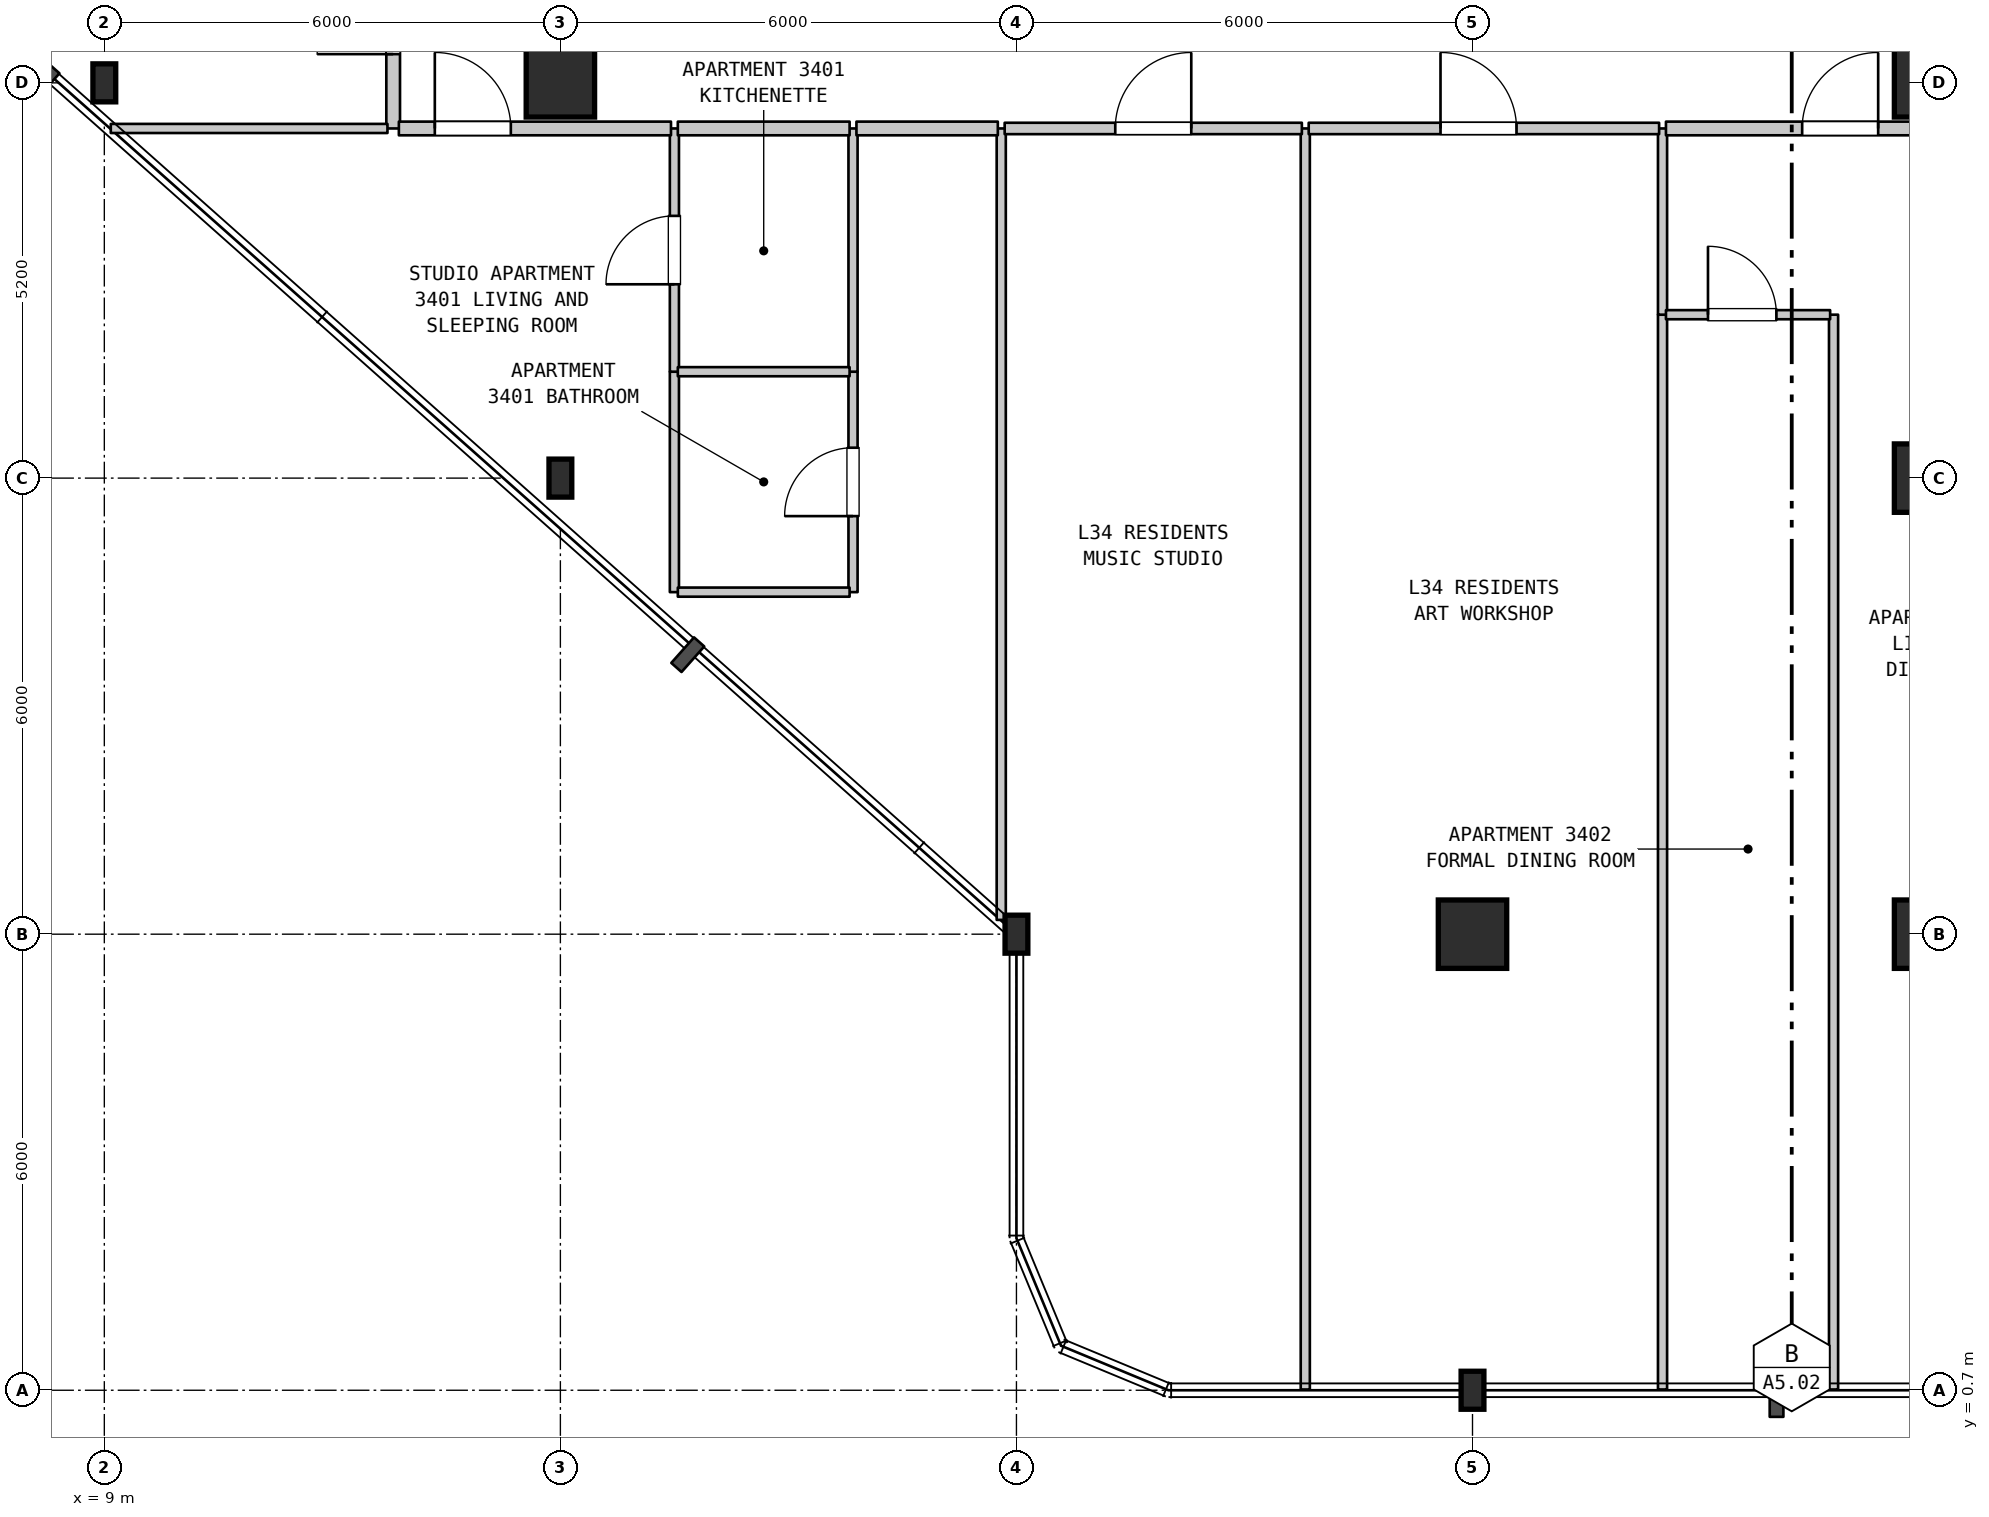
"""IFC4 building model, lengths in metres.
Left out: names, types, materials, properties, quantities, classifications, styles, units other than length and angle.
Written with IfcOpenShell. Run it as: python <this file> out.ifc"""

import sys

from ifc_helpers import new_model, si_unit, direction, frame, frame_2d, origin, origin_2d, place, context, subcontext, project, spatial, rectangle, i_section, extrude, element, fill, save


model = new_model("IFC4")
c1 = context("Model", 3, precision=1e-05, world=origin(), true_north=direction((0.0, 1.0)))
c2 = subcontext(c1, "Body", "Model", "MODEL_VIEW")
j1 = project(units=[si_unit("LENGTHUNIT", "METRE"), si_unit("PLANEANGLEUNIT", "RADIAN")], contexts=[c1])
p1 = place(None, origin())
s1 = spatial("IfcSite", under=j1, at=p1, CompositionType="ELEMENT")
p2 = place(p1, origin())
s2 = spatial("IfcBuilding", under=s1, at=p2, CompositionType="ELEMENT")
p3 = place(p2, frame((0.0, 0.0, 140.9)))
s3 = spatial("IfcBuildingStorey", under=s2, at=p3, CompositionType="ELEMENT", Elevation=140.9)
for number, where, z_axis, x_axis in (
    (1, (9.0, 17.9, 0.0), (0.0, 0.0, 1.0), (1.0, 0.0, 0.0)),
    (2, (15.0, 12.7, 0.0), (0.0, 0.0, 1.0), (1.0, 0.0, 0.0)),
):
    element("IfcColumn", number, at=place(p3, frame(where, z_axis=z_axis, x_axis=x_axis)), inside=s3, PredefinedType="COLUMN", context=c2, shape_type="SweptSolid", body=[
        extrude(i_section(OverallWidth=0.3, OverallDepth=0.5, WebThickness=0.014, FlangeThickness=0.028, FilletRadius=0.027, at=origin_2d()), origin(), (0.0, 0.0, 1.0), 3.7),
    ])
p4 = place(p3, frame((15.0, 17.9, 0.0), z_axis=(0.0, 0.0, 1.0), x_axis=(1.0, 0.0, 0.0)))
e3 = element("IfcColumn", 3, at=p4, inside=s3, PredefinedType="COLUMN", context=c2, shape_type="SweptSolid", body=[
    extrude(rectangle(XDim=0.9, YDim=0.9, at=origin_2d()), origin(), (0.0, 0.0, 1.0), 3.7),
])
for number, where, z_axis, x_axis in (
    (4, (21.0, 6.7, 0.0), (0.0, 0.0, 1.0), (1.0, 0.0, 0.0)),
    (5, (27.0, 0.7, 0.0), (0.0, 0.0, 1.0), (1.0, 0.0, 0.0)),
):
    element("IfcColumn", number, at=place(p3, frame(where, z_axis=z_axis, x_axis=x_axis)), inside=s3, PredefinedType="COLUMN", context=c2, shape_type="SweptSolid", body=[
        extrude(i_section(OverallWidth=0.3, OverallDepth=0.5, WebThickness=0.014, FlangeThickness=0.028, FilletRadius=0.027, at=origin_2d()), origin(), (0.0, 0.0, 1.0), 3.7),
    ])
for number, where, z_axis, x_axis in (
    (6, (27.0, 6.7, 0.0), (0.0, 0.0, 1.0), (1.0, 0.0, 0.0)),
    (7, (33.0, 6.7, 0.0), (0.0, 0.0, 1.0), (1.0, 0.0, 0.0)),
    (8, (33.0, 12.7, 0.0), (0.0, 0.0, 1.0), (1.0, 0.0, 0.0)),
    (9, (33.0, 17.9, 0.0), (0.0, 0.0, 1.0), (1.0, 0.0, 0.0)),
):
    element("IfcColumn", number, at=place(p3, frame(where, z_axis=z_axis, x_axis=x_axis)), inside=s3, PredefinedType="COLUMN", context=c2, shape_type="SweptSolid", body=[
        extrude(rectangle(XDim=0.9, YDim=0.9, at=origin_2d()), origin(), (0.0, 0.0, 1.0), 3.7),
    ])
p5 = place(p3, frame((12.8, 17.3, 0.0), z_axis=(0.0, 0.0, 1.0), x_axis=(0.0, 1.0, 0.0)))
e10 = element("IfcWall", 10, at=p5, inside=s3, PredefinedType="STANDARD", context=c2, shape_type="SweptSolid", body=[
    extrude(rectangle(XDim=3.1, YDim=0.18, at=frame_2d((1.55, 0.0))), origin(), (0.0, 0.0, 1.0), 3.385),
])
p6 = place(p5, frame((0.978, 0.0, 0.0)))
e11 = element("IfcOpeningElement", 11, at=p6, cuts=e10, PredefinedType="OPENING", context=c2, shape_type="SweptSolid", body=[
    extrude(rectangle(XDim=1.0, YDim=2.15, at=frame_2d((0.5, 1.075))), frame((0.0, 0.1, 0.0), z_axis=(0.0, -1.0, 0.0), x_axis=(1.0, 0.0, 0.0)), (0.0, 0.0, 1.0), 0.2),
])
p7 = place(p3, frame((16.5, 11.2, 0.0), z_axis=(0.0, 0.0, 1.0), x_axis=(0.0, 1.0, 0.0)))
e12 = element("IfcWall", 12, at=p7, inside=s3, PredefinedType="PARTITIONING", context=c2, shape_type="SweptSolid", body=[
    extrude(rectangle(XDim=2.9, YDim=0.12, at=frame_2d((1.45, 0.0))), origin(), (0.0, 0.0, 1.0), 3.385),
])
p8 = place(p3, frame((16.5, 14.1, 0.0), z_axis=(0.0, 0.0, 1.0), x_axis=(0.0, 1.0, 0.0)))
e13 = element("IfcWall", 13, at=p8, inside=s3, PredefinedType="PARTITIONING", context=c2, shape_type="SweptSolid", body=[
    extrude(rectangle(XDim=3.2, YDim=0.12, at=frame_2d((1.6, 0.0))), origin(), (0.0, 0.0, 1.0), 3.385),
])
p9 = place(p8, frame((1.15, 0.0, 0.0)))
e14 = element("IfcOpeningElement", 14, at=p9, cuts=e13, PredefinedType="OPENING", context=c2, shape_type="SweptSolid", body=[
    extrude(rectangle(XDim=0.9, YDim=2.15, at=frame_2d((0.45, 1.075))), frame((0.0, 0.07, 0.0), z_axis=(0.0, -1.0, 0.0), x_axis=(1.0, 0.0, 0.0)), (0.0, 0.0, 1.0), 0.14),
])
p10 = place(p3, frame((18.85, 11.2, 0.0), z_axis=(0.0, 0.0, 1.0), x_axis=(0.0, 1.0, 0.0)))
e15 = element("IfcWall", 15, at=p10, inside=s3, PredefinedType="PARTITIONING", context=c2, shape_type="SweptSolid", body=[
    extrude(rectangle(XDim=2.9, YDim=0.12, at=frame_2d((1.45, 0.0))), origin(), (0.0, 0.0, 1.0), 3.385),
])
p11 = place(p10, frame((1.0, 0.0, 0.0)))
e16 = element("IfcOpeningElement", 16, at=p11, cuts=e15, PredefinedType="OPENING", context=c2, shape_type="SweptSolid", body=[
    extrude(rectangle(XDim=0.9, YDim=2.1, at=frame_2d((0.45, 1.05))), frame((0.0, 0.07, 0.0), z_axis=(0.0, -1.0, 0.0), x_axis=(1.0, 0.0, 0.0)), (0.0, 0.0, 1.0), 0.14),
])
p12 = place(p3, frame((18.85, 14.1, 0.0), z_axis=(0.0, 0.0, 1.0), x_axis=(0.0, 1.0, 0.0)))
e17 = element("IfcWall", 17, at=p12, inside=s3, PredefinedType="PARTITIONING", context=c2, shape_type="SweptSolid", body=[
    extrude(rectangle(XDim=3.2, YDim=0.12, at=frame_2d((1.6, 0.0))), origin(), (0.0, 0.0, 1.0), 3.385),
])
p13 = place(p3, frame((20.8, 6.888, 0.0), z_axis=(0.0, 0.0, 1.0), x_axis=(0.0, 1.0, 0.0)))
e18 = element("IfcWall", 18, at=p13, inside=s3, PredefinedType="PARTITIONING", context=c2, shape_type="SweptSolid", body=[
    extrude(rectangle(XDim=10.412, YDim=0.12, at=frame_2d((5.206, 0.0))), origin(), (0.0, 0.0, 1.0), 3.385),
])
p14 = place(p3, frame((24.8, 0.71, 0.0), z_axis=(0.0, 0.0, 1.0), x_axis=(0.0, 1.0, 0.0)))
e19 = element("IfcWall", 19, at=p14, inside=s3, PredefinedType="PARTITIONING", context=c2, shape_type="SweptSolid", body=[
    extrude(rectangle(XDim=16.59, YDim=0.12, at=frame_2d((8.295, 0.0))), origin(), (0.0, 0.0, 1.0), 3.385),
])
p15 = place(p3, frame((29.5, 0.71, 0.0), z_axis=(0.0, 0.0, 1.0), x_axis=(0.0, 1.0, 0.0)))
e20 = element("IfcWall", 20, at=p15, inside=s3, PredefinedType="PARTITIONING", context=c2, shape_type="SweptSolid", body=[
    extrude(rectangle(XDim=14.14, YDim=0.12, at=frame_2d((7.07, 0.0))), origin(), (0.0, 0.0, 1.0), 3.385),
])
p16 = place(p3, frame((29.5, 14.85, 0.0), z_axis=(0.0, 0.0, 1.0), x_axis=(0.0, 1.0, 0.0)))
e21 = element("IfcWall", 21, at=p16, inside=s3, PredefinedType="PARTITIONING", context=c2, shape_type="SweptSolid", body=[
    extrude(rectangle(XDim=2.45, YDim=0.12, at=frame_2d((1.225, 0.0))), origin(), (0.0, 0.0, 1.0), 3.385),
])
p17 = place(p3, frame((31.75, 0.71, 0.0), z_axis=(0.0, 0.0, 1.0), x_axis=(0.0, 1.0, 0.0)))
e22 = element("IfcWall", 22, at=p17, inside=s3, PredefinedType="PARTITIONING", context=c2, shape_type="SweptSolid", body=[
    extrude(rectangle(XDim=14.14, YDim=0.12, at=frame_2d((7.07, 0.0))), origin(), (0.0, 0.0, 1.0), 3.385),
])
for number, where, z_axis, x_axis in (
    (23, (16.545, 11.2, 0.0), (0.0, 0.0, 1.0), (1.0, 0.0, 0.0)),
    (24, (16.545, 14.1, 0.0), (0.0, 0.0, 1.0), (1.0, 0.0, 0.0)),
):
    element("IfcWall", number, at=place(p3, frame(where, z_axis=z_axis, x_axis=x_axis)), inside=s3, PredefinedType="PARTITIONING", context=c2, shape_type="SweptSolid", body=[
        extrude(rectangle(XDim=2.26, YDim=0.12, at=frame_2d((1.13, 0.0))), origin(), (0.0, 0.0, 1.0), 3.385),
    ])
p18 = place(p3, frame((29.545, 14.85, 0.0), z_axis=(0.0, 0.0, 1.0), x_axis=(1.0, 0.0, 0.0)))
e25 = element("IfcWall", 25, at=p18, inside=s3, PredefinedType="PARTITIONING", context=c2, shape_type="SweptSolid", body=[
    extrude(rectangle(XDim=2.16, YDim=0.12, at=frame_2d((1.08, 0.0))), origin(), (0.0, 0.0, 1.0), 3.385),
])
p19 = place(p18, frame((0.553, 0.0, 0.0)))
e26 = element("IfcOpeningElement", 26, at=p19, cuts=e25, PredefinedType="OPENING", context=c2, shape_type="SweptSolid", body=[
    extrude(rectangle(XDim=0.9, YDim=2.15, at=frame_2d((0.45, 1.075))), frame((0.0, 0.07, 0.0), z_axis=(0.0, -1.0, 0.0), x_axis=(1.0, 0.0, 0.0)), (0.0, 0.0, 1.0), 0.14),
])
p20 = place(p3, frame((9.085, 17.3, 0.0), z_axis=(0.0, 0.0, 1.0), x_axis=(1.0, 0.0, 0.0)))
e27 = element("IfcWall", 27, at=p20, inside=s3, PredefinedType="PARTITIONING", context=c2, shape_type="SweptSolid", body=[
    extrude(rectangle(XDim=3.64, YDim=0.12, at=frame_2d((1.82, 0.0))), origin(), (0.0, 0.0, 1.0), 3.385),
])
p21 = place(p3, frame((12.875, 17.3, 0.0), z_axis=(0.0, 0.0, 1.0), x_axis=(1.0, 0.0, 0.0)))
e28 = element("IfcWall", 28, at=p21, inside=s3, PredefinedType="STANDARD", context=c2, shape_type="SweptSolid", body=[
    extrude(rectangle(XDim=3.58, YDim=0.18, at=frame_2d((1.79, 0.0))), origin(), (0.0, 0.0, 1.0), 3.385),
])
p22 = place(p21, frame((0.473, 0.0, 0.0)))
e29 = element("IfcOpeningElement", 29, at=p22, cuts=e28, PredefinedType="OPENING", context=c2, shape_type="SweptSolid", body=[
    extrude(rectangle(XDim=1.0, YDim=2.15, at=frame_2d((0.5, 1.075))), frame((0.0, 0.1, 0.0), z_axis=(0.0, -1.0, 0.0), x_axis=(1.0, 0.0, 0.0)), (0.0, 0.0, 1.0), 0.2),
])
p23 = place(p3, frame((16.545, 17.3, 0.0), z_axis=(0.0, 0.0, 1.0), x_axis=(1.0, 0.0, 0.0)))
e30 = element("IfcWall", 30, at=p23, inside=s3, PredefinedType="STANDARD", context=c2, shape_type="SweptSolid", body=[
    extrude(rectangle(XDim=2.26, YDim=0.18, at=frame_2d((1.13, 0.0))), origin(), (0.0, 0.0, 1.0), 3.385),
])
p24 = place(p3, frame((18.895, 17.3, 0.0), z_axis=(0.0, 0.0, 1.0), x_axis=(1.0, 0.0, 0.0)))
e31 = element("IfcWall", 31, at=p24, inside=s3, PredefinedType="STANDARD", context=c2, shape_type="SweptSolid", body=[
    extrude(rectangle(XDim=1.86, YDim=0.18, at=frame_2d((0.93, 0.0))), origin(), (0.0, 0.0, 1.0), 3.385),
])
p25 = place(p3, frame((20.845, 17.3, 0.0), z_axis=(0.0, 0.0, 1.0), x_axis=(1.0, 0.0, 0.0)))
e32 = element("IfcWall", 32, at=p25, inside=s3, PredefinedType="STANDARD", context=c2, shape_type="SweptSolid", body=[
    extrude(rectangle(XDim=3.91, YDim=0.15, at=frame_2d((1.955, 0.0))), origin(), (0.0, 0.0, 1.0), 3.385),
])
p26 = place(p25, frame((1.455, 0.0, 0.0)))
e33 = element("IfcOpeningElement", 33, at=p26, cuts=e32, PredefinedType="OPENING", context=c2, shape_type="SweptSolid", body=[
    extrude(rectangle(XDim=1.0, YDim=2.15, at=frame_2d((0.5, 1.075))), frame((0.0, 0.085, 0.0), z_axis=(0.0, -1.0, 0.0), x_axis=(1.0, 0.0, 0.0)), (0.0, 0.0, 1.0), 0.17),
])
p27 = place(p3, frame((24.845, 17.3, 0.0), z_axis=(0.0, 0.0, 1.0), x_axis=(1.0, 0.0, 0.0)))
e34 = element("IfcWall", 34, at=p27, inside=s3, PredefinedType="STANDARD", context=c2, shape_type="SweptSolid", body=[
    extrude(rectangle(XDim=4.61, YDim=0.15, at=frame_2d((2.305, 0.0))), origin(), (0.0, 0.0, 1.0), 3.385),
])
p28 = place(p27, frame((1.734, 0.0, 0.0)))
e35 = element("IfcOpeningElement", 35, at=p28, cuts=e34, PredefinedType="OPENING", context=c2, shape_type="SweptSolid", body=[
    extrude(rectangle(XDim=1.0, YDim=2.15, at=frame_2d((0.5, 1.075))), frame((0.0, 0.085, 0.0), z_axis=(0.0, -1.0, 0.0), x_axis=(1.0, 0.0, 0.0)), (0.0, 0.0, 1.0), 0.17),
])
p29 = place(p3, frame((29.545, 17.3, 0.0), z_axis=(0.0, 0.0, 1.0), x_axis=(1.0, 0.0, 0.0)))
e36 = element("IfcWall", 36, at=p29, inside=s3, PredefinedType="STANDARD", context=c2, shape_type="SweptSolid", body=[
    extrude(rectangle(XDim=5.095, YDim=0.18, at=frame_2d((2.547, 0.0))), origin(), (0.0, 0.0, 1.0), 3.385),
])
p30 = place(p29, frame((1.792, 0.0, 0.0)))
e37 = element("IfcOpeningElement", 37, at=p30, cuts=e36, PredefinedType="OPENING", context=c2, shape_type="SweptSolid", body=[
    extrude(rectangle(XDim=1.0, YDim=2.15, at=frame_2d((0.5, 1.075))), frame((0.0, 0.1, 0.0), z_axis=(0.0, -1.0, 0.0), x_axis=(1.0, 0.0, 0.0)), (0.0, 0.0, 1.0), 0.2),
])
p31 = place(p6, origin())
e38 = element("IfcDoor", 38, at=p31, inside=s3, OperationType="SINGLE_SWING_LEFT", PredefinedType="DOOR", context=c2, shape_type="SweptSolid", body=[
    extrude(rectangle(XDim=1.0, YDim=2.15, at=frame_2d((0.5, 1.075))), frame((0.0, 0.025, 0.0), z_axis=(0.0, -1.0, 0.0), x_axis=(1.0, 0.0, 0.0)), (0.0, 0.0, 1.0), 0.05),
])
fill(e11, e38)
p32 = place(p9, origin())
e39 = element("IfcDoor", 39, at=p32, inside=s3, OperationType="SINGLE_SWING_LEFT", PredefinedType="DOOR", context=c2, shape_type="SweptSolid", body=[
    extrude(rectangle(XDim=0.9, YDim=2.15, at=frame_2d((0.45, 1.075))), frame((0.0, 0.025, 0.0), z_axis=(0.0, -1.0, 0.0), x_axis=(1.0, 0.0, 0.0)), (0.0, 0.0, 1.0), 0.05),
])
fill(e14, e39)
p33 = place(p11, origin())
e40 = element("IfcDoor", 40, at=p33, inside=s3, OperationType="SINGLE_SWING_LEFT", PredefinedType="DOOR", context=c2, shape_type="SweptSolid", body=[
    extrude(rectangle(XDim=0.9, YDim=2.1, at=frame_2d((0.45, 1.05))), frame((0.0, 0.025, 0.0), z_axis=(0.0, -1.0, 0.0), x_axis=(1.0, 0.0, 0.0)), (0.0, 0.0, 1.0), 0.05),
])
fill(e16, e40)
p34 = place(p19, origin())
e41 = element("IfcDoor", 41, at=p34, inside=s3, OperationType="SINGLE_SWING_LEFT", PredefinedType="DOOR", context=c2, shape_type="SweptSolid", body=[
    extrude(rectangle(XDim=0.9, YDim=2.15, at=frame_2d((0.45, 1.075))), frame((0.0, 0.025, 0.0), z_axis=(0.0, -1.0, 0.0), x_axis=(1.0, 0.0, 0.0)), (0.0, 0.0, 1.0), 0.05),
])
fill(e26, e41)
p35 = place(p22, origin())
e42 = element("IfcDoor", 42, at=p35, inside=s3, OperationType="SINGLE_SWING_LEFT", PredefinedType="DOOR", context=c2, shape_type="SweptSolid", body=[
    extrude(rectangle(XDim=1.0, YDim=2.15, at=frame_2d((0.5, 1.075))), frame((0.0, 0.025, 0.0), z_axis=(0.0, -1.0, 0.0), x_axis=(1.0, 0.0, 0.0)), (0.0, 0.0, 1.0), 0.05),
])
fill(e29, e42)
p36 = place(p26, origin())
e43 = element("IfcDoor", 43, at=p36, inside=s3, OperationType="SINGLE_SWING_RIGHT", PredefinedType="DOOR", context=c2, shape_type="SweptSolid", body=[
    extrude(rectangle(XDim=1.0, YDim=2.15, at=frame_2d((0.5, 1.075))), frame((0.0, 0.025, 0.0), z_axis=(0.0, -1.0, 0.0), x_axis=(1.0, 0.0, 0.0)), (0.0, 0.0, 1.0), 0.05),
])
fill(e33, e43)
p37 = place(p28, origin())
e44 = element("IfcDoor", 44, at=p37, inside=s3, OperationType="SINGLE_SWING_LEFT", PredefinedType="DOOR", context=c2, shape_type="SweptSolid", body=[
    extrude(rectangle(XDim=1.0, YDim=2.15, at=frame_2d((0.5, 1.075))), frame((0.0, 0.025, 0.0), z_axis=(0.0, -1.0, 0.0), x_axis=(1.0, 0.0, 0.0)), (0.0, 0.0, 1.0), 0.05),
])
fill(e35, e44)
p38 = place(p30, origin())
e45 = element("IfcDoor", 45, at=p38, inside=s3, OperationType="SINGLE_SWING_RIGHT", PredefinedType="DOOR", context=c2, shape_type="SweptSolid", body=[
    extrude(rectangle(XDim=1.0, YDim=2.15, at=frame_2d((0.5, 1.075))), frame((0.0, 0.025, 0.0), z_axis=(0.0, -1.0, 0.0), x_axis=(1.0, 0.0, 0.0)), (0.0, 0.0, 1.0), 0.05),
])
fill(e37, e45)
save(model, sys.argv[1])
